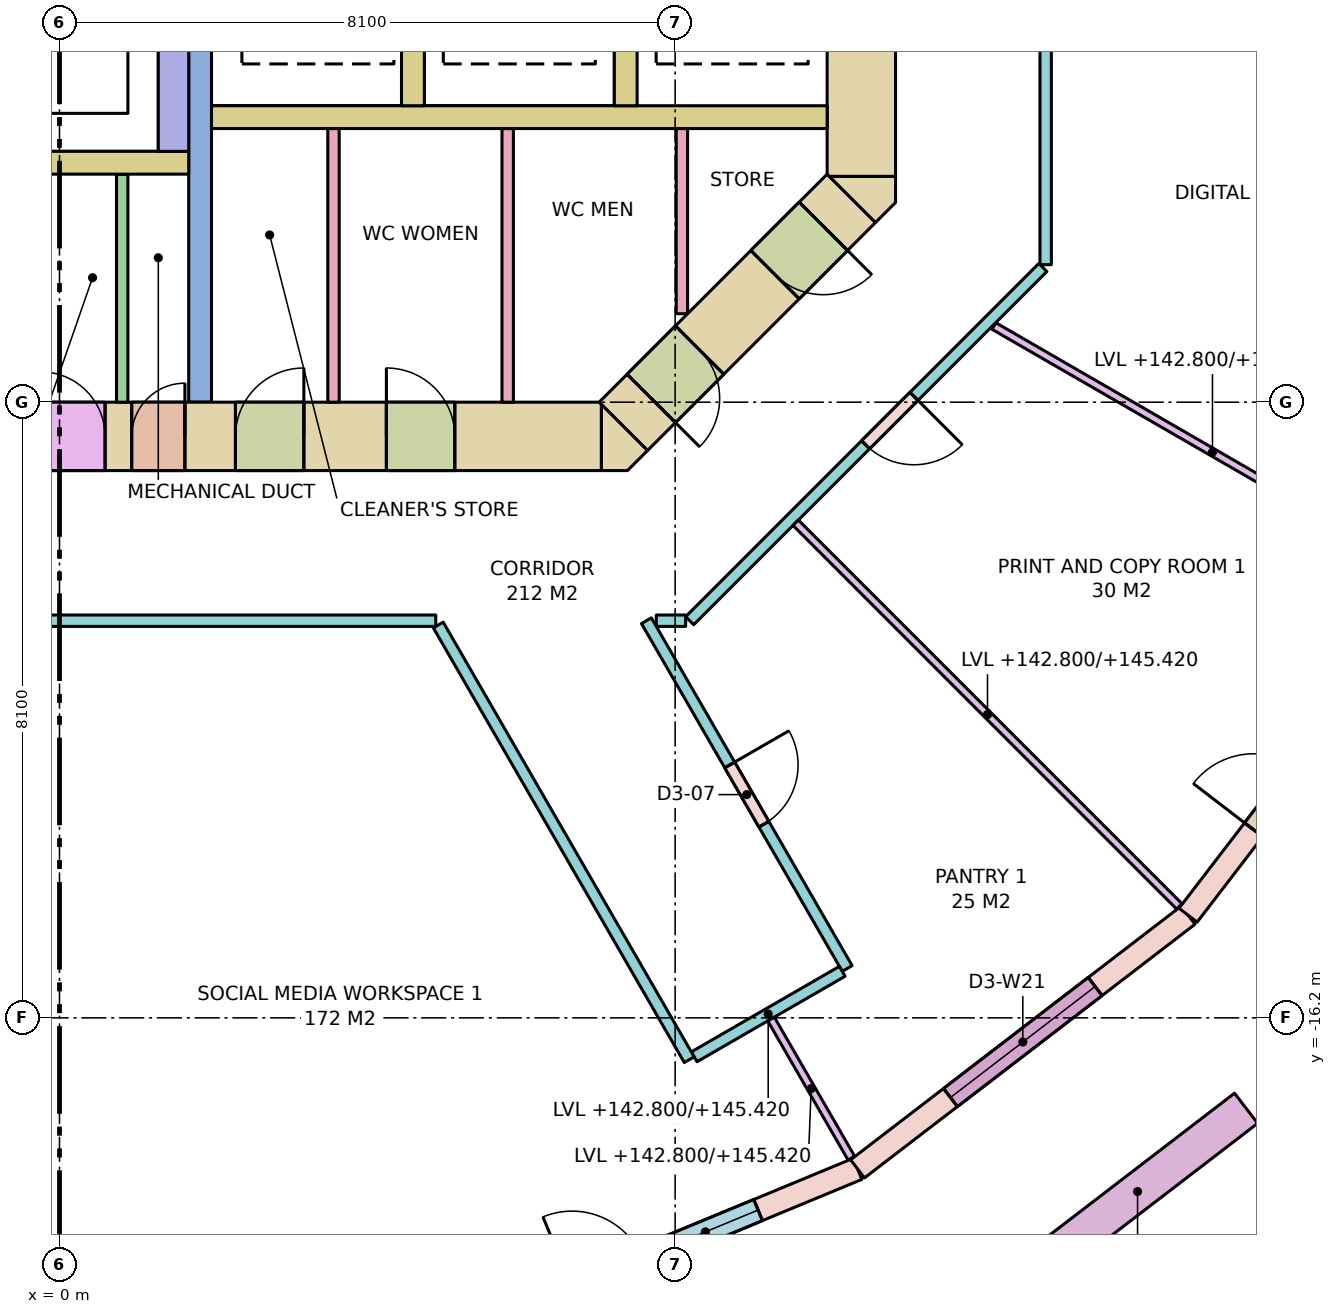
"""IFC4 building model, lengths in metres.
Left out: names, types, materials, properties, quantities, classifications, styles, units other than length and angle.
Written with IfcOpenShell. Run it as: python <this file> out.ifc"""

import sys

from ifc_helpers import new_model, si_unit, direction, frame, frame_2d, origin, place, context, subcontext, project, spatial, polyline, rectangle, outline, extrude, element, fill, save


model = new_model("IFC4")
c1 = context("Model", 3, precision=1e-05, world=origin(), true_north=direction((0.0, 1.0)))
c2 = subcontext(c1, "Body", "Model", "MODEL_VIEW")
j1 = project(units=[si_unit("LENGTHUNIT", "METRE"), si_unit("PLANEANGLEUNIT", "RADIAN")], contexts=[c1])
p1 = place(None, origin())
s1 = spatial("IfcSite", under=j1, at=p1, CompositionType="ELEMENT")
p2 = place(p1, origin())
s2 = spatial("IfcBuilding", under=s1, at=p2, CompositionType="ELEMENT")
p3 = place(p2, frame((0.0, 0.0, 142.8)))
s3 = spatial("IfcBuildingStorey", under=s2, at=p3, CompositionType="ELEMENT", Elevation=142.8)
p4 = place(p3, frame((-7.13, -8.55, -0.28), z_axis=(0.0, 0.0, 1.0), x_axis=(1.0, 0.0, 0.0)))
e1 = element("IfcWall", 1, at=p4, inside=s3, PredefinedType="SHEAR", context=c2, shape_type="SweptSolid", body=[
    extrude(rectangle(XDim=14.26, YDim=0.9, at=frame_2d((7.13, 0.0))), origin(), (0.0, 0.0, 1.0), 3.8),
])
p5 = place(p4, frame((8.08, 0.0, 0.28)))
e2 = element("IfcOpeningElement", 2, at=p5, cuts=e1, PredefinedType="OPENING", context=c2, shape_type="SweptSolid", body=[
    extrude(rectangle(XDim=0.7, YDim=2.1, at=frame_2d((0.35, 1.05))), frame((0.0, 0.46, 0.0), z_axis=(0.0, -1.0, 0.0), x_axis=(1.0, 0.0, 0.0)), (0.0, 0.0, 1.0), 0.92),
])
p6 = place(p4, frame((5.58, 0.0, 0.28)))
e3 = element("IfcOpeningElement", 3, at=p6, cuts=e1, PredefinedType="OPENING", context=c2, shape_type="SweptSolid", body=[
    extrude(rectangle(XDim=0.85, YDim=2.1, at=frame_2d((0.425, 1.05))), frame((0.0, 0.46, 0.0), z_axis=(0.0, -1.0, 0.0), x_axis=(1.0, 0.0, 0.0)), (0.0, 0.0, 1.0), 0.92),
])
p7 = place(p4, frame((6.88, 0.0, 0.28)))
e4 = element("IfcOpeningElement", 4, at=p7, cuts=e1, PredefinedType="OPENING", context=c2, shape_type="SweptSolid", body=[
    extrude(rectangle(XDim=0.85, YDim=2.1, at=frame_2d((0.425, 1.05))), frame((0.0, 0.46, 0.0), z_axis=(0.0, -1.0, 0.0), x_axis=(1.0, 0.0, 0.0)), (0.0, 0.0, 1.0), 0.92),
])
p8 = place(p4, frame((9.445, 0.0, 0.28)))
e5 = element("IfcOpeningElement", 5, at=p8, cuts=e1, PredefinedType="OPENING", context=c2, shape_type="SweptSolid", body=[
    extrude(rectangle(XDim=0.9, YDim=2.1, at=frame_2d((0.45, 1.05))), frame((0.0, 0.46, 0.0), z_axis=(0.0, -1.0, 0.0), x_axis=(1.0, 0.0, 0.0)), (0.0, 0.0, 1.0), 0.92),
])
p9 = place(p4, frame((11.431, 0.0, 0.28)))
e6 = element("IfcOpeningElement", 6, at=p9, cuts=e1, PredefinedType="OPENING", context=c2, shape_type="SweptSolid", body=[
    extrude(rectangle(XDim=0.9, YDim=2.1, at=frame_2d((0.45, 1.05))), frame((0.0, 0.46, 0.0), z_axis=(0.0, -1.0, 0.0), x_axis=(1.0, 0.0, 0.0)), (0.0, 0.0, 1.0), 0.92),
])
p10 = place(p3, frame((10.55, -5.13, -0.28), z_axis=(0.0, 0.0, 1.0), x_axis=(0.0, 1.0, 0.0)))
e7 = element("IfcWall", 7, at=p10, inside=s3, PredefinedType="SHEAR", context=c2, shape_type="SweptSolid", body=[
    extrude(rectangle(XDim=10.26, YDim=0.9, at=frame_2d((5.13, 0.0))), origin(), (0.0, 0.0, 1.0), 3.8),
])
p11 = place(p10, frame((4.13, 0.0, 0.28)))
e8 = element("IfcOpeningElement", 8, at=p11, cuts=e7, PredefinedType="OPENING", context=c2, shape_type="SweptSolid", body=[
    extrude(rectangle(XDim=2.0, YDim=2.1, at=frame_2d((1.0, 1.05))), frame((0.0, 0.46, 0.0), z_axis=(0.0, -1.0, 0.0), x_axis=(1.0, 0.0, 0.0)), (0.0, 0.0, 1.0), 0.92),
])
p12 = place(p3, frame((10.418, -5.418, -0.28), z_axis=(0.0, 0.0, 1.0), x_axis=(-0.707106781187, -0.707106781187, 0.0)))
e9 = element("IfcWall", 9, at=p12, inside=s3, PredefinedType="SHEAR", context=c2, shape_type="SweptSolid", body=[
    extrude(rectangle(XDim=4.243, YDim=0.9, at=frame_2d((2.121, 0.0))), origin(), (0.0, 0.0, 1.0), 3.8),
])
p13 = place(p12, frame((2.823, 0.0, 0.28)))
e10 = element("IfcOpeningElement", 10, at=p13, cuts=e9, PredefinedType="OPENING", context=c2, shape_type="SweptSolid", body=[
    extrude(rectangle(XDim=0.9, YDim=2.1, at=frame_2d((0.45, 1.05))), frame((0.0, 0.46, 0.0), z_axis=(0.0, -1.0, 0.0), x_axis=(1.0, 0.0, 0.0)), (0.0, 0.0, 1.0), 0.92),
])
p14 = place(p12, frame((0.52, 0.0, 0.28)))
e11 = element("IfcOpeningElement", 11, at=p14, cuts=e9, PredefinedType="OPENING", context=c2, shape_type="SweptSolid", body=[
    extrude(rectangle(XDim=0.9, YDim=2.1, at=frame_2d((0.45, 1.05))), frame((0.0, 0.46, 0.0), z_axis=(0.0, -1.0, 0.0), x_axis=(1.0, 0.0, 0.0)), (0.0, 0.0, 1.0), 0.92),
])
p15 = place(p3, frame((0.0, 0.0, -0.28)))
e12 = element("IfcWall", 12, at=p15, inside=s3, PredefinedType="SHEAR", context=c2, shape_type="SweptSolid", body=[
    extrude(outline(polyline([(7.473, -9.0), (7.13, -9.0), (7.13, -8.13), (7.736, -8.736), (7.473, -9.0)])), origin(), (0.0, 0.0, 1.0), 3.8),
])
p16 = place(p3, frame((0.0, 0.0, -0.28)))
e13 = element("IfcWall", 13, at=p16, inside=s3, PredefinedType="SHEAR", context=c2, shape_type="SweptSolid", body=[
    extrude(outline(polyline([(11.0, -5.473), (10.736, -5.736), (10.13, -5.13), (11.0, -5.13), (11.0, -5.473)])), origin(), (0.0, 0.0, 1.0), 3.8),
])
p17 = place(p3, frame((2.0, -4.35, 0.0), z_axis=(0.0, 0.0, 1.0), x_axis=(1.0, 0.0, 0.0)))
e14 = element("IfcWall", 14, at=p17, inside=s3, PredefinedType="SOLIDWALL", context=c2, shape_type="SweptSolid", body=[
    extrude(rectangle(XDim=8.1, YDim=0.3, at=frame_2d((4.05, 0.0))), origin(), (0.0, 0.0, 1.0), 3.52),
])
for number, where, z_axis, x_axis in (
    (15, (4.65, -4.2, 0.0), (0.0, 0.0, 1.0), (0.0, 1.0, 0.0)),
    (16, (7.45, -4.2, 0.0), (0.0, 0.0, 1.0), (0.0, 1.0, 0.0)),
):
    element("IfcWall", number, at=place(p3, frame(where, z_axis=z_axis, x_axis=x_axis)), inside=s3, PredefinedType="SOLIDWALL", context=c2, shape_type="SweptSolid", body=[
        extrude(rectangle(XDim=2.4, YDim=0.3, at=frame_2d((1.2, 0.0))), origin(), (0.0, 0.0, 1.0), 3.52),
    ])
p18 = place(p3, frame((1.85, -8.1, 0.0), z_axis=(0.0, 0.0, 1.0), x_axis=(0.0, 1.0, 0.0)))
e17 = element("IfcWall", 17, at=p18, inside=s3, PredefinedType="SHEAR", context=c2, shape_type="SweptSolid", body=[
    extrude(rectangle(XDim=6.6, YDim=0.3, at=frame_2d((3.3, 0.0))), origin(), (0.0, 0.0, 1.0), 3.52),
])
p19 = place(p3, frame((1.5, -4.8, 0.0), z_axis=(0.0, 0.0, 1.0), x_axis=(0.0, 1.0, 0.0)))
e18 = element("IfcWall", 18, at=p19, inside=s3, PredefinedType="SOLIDWALL", context=c2, shape_type="SweptSolid", body=[
    extrude(rectangle(XDim=3.0, YDim=0.4, at=frame_2d((1.5, 0.0))), origin(), (0.0, 0.0, 1.0), 3.52),
])
p20 = place(p3, frame((-1.7, -4.95, 0.0), z_axis=(0.0, 0.0, 1.0), x_axis=(1.0, 0.0, 0.0)))
e19 = element("IfcWall", 19, at=p20, inside=s3, PredefinedType="SOLIDWALL", context=c2, shape_type="SweptSolid", body=[
    extrude(rectangle(XDim=3.4, YDim=0.3, at=frame_2d((1.7, 0.0))), origin(), (0.0, 0.0, 1.0), 3.52),
])
p21 = place(p3, frame((5.435, -20.284, 0.0), z_axis=(0.0, 0.0, 1.0), x_axis=(0.923877333662, 0.382688740813, 0.0)))
e20 = element("IfcWall", 20, at=p21, inside=s3, PredefinedType="STANDARD", context=c2, shape_type="SweptSolid", body=[
    extrude(rectangle(XDim=5.482, YDim=0.3, at=frame_2d((2.741, 0.0))), origin(), (0.0, 0.0, 1.0), 3.52),
])
p22 = place(p21, frame((1.416, 0.0, 0.0)))
e21 = element("IfcOpeningElement", 21, at=p22, cuts=e20, PredefinedType="OPENING", context=c2, shape_type="SweptSolid", body=[
    extrude(rectangle(XDim=1.0, YDim=2.4, at=frame_2d((0.5, 1.2))), frame((0.0, 0.16, 0.0), z_axis=(0.0, -1.0, 0.0), x_axis=(1.0, 0.0, 0.0)), (0.0, 0.0, 1.0), 0.32),
])
p23 = place(p21, frame((2.566, 0.0, 0.8)))
e22 = element("IfcOpeningElement", 22, at=p23, cuts=e20, PredefinedType="OPENING", context=c2, shape_type="SweptSolid", body=[
    extrude(rectangle(XDim=1.5, YDim=2.5, at=frame_2d((0.75, 1.25))), frame((0.0, 0.16, 0.0), z_axis=(0.0, -1.0, 0.0), x_axis=(1.0, 0.0, 0.0)), (0.0, 0.0, 1.0), 0.32),
])
p24 = place(p3, frame((10.5, -18.187, 0.0), z_axis=(0.0, 0.0, 1.0), x_axis=(0.793335336593, 0.608784891166, 0.0)))
e23 = element("IfcWall", 23, at=p24, inside=s3, PredefinedType="STANDARD", context=c2, shape_type="SweptSolid", body=[
    extrude(rectangle(XDim=5.482, YDim=0.3, at=frame_2d((2.741, 0.0))), origin(), (0.0, 0.0, 1.0), 3.52),
])
p25 = place(p24, frame((1.541, 0.0, 0.8)))
e24 = element("IfcOpeningElement", 24, at=p25, cuts=e23, PredefinedType="OPENING", context=c2, shape_type="SweptSolid", body=[
    extrude(rectangle(XDim=2.4, YDim=2.5, at=frame_2d((1.2, 1.25))), frame((0.0, 0.16, 0.0), z_axis=(0.0, -1.0, 0.0), x_axis=(1.0, 0.0, 0.0)), (0.0, 0.0, 1.0), 0.32),
])
p26 = place(p3, frame((14.849, -14.849, 0.0), z_axis=(0.0, 0.0, 1.0), x_axis=(0.608784891166, 0.793335336593, 0.0)))
e25 = element("IfcWall", 25, at=p26, inside=s3, PredefinedType="STANDARD", context=c2, shape_type="SweptSolid", body=[
    extrude(rectangle(XDim=5.482, YDim=0.3, at=frame_2d((2.741, 0.0))), origin(), (0.0, 0.0, 1.0), 3.52),
])
p27 = place(p26, frame((1.416, 0.0, 0.0)))
e26 = element("IfcOpeningElement", 26, at=p27, cuts=e25, PredefinedType="OPENING", context=c2, shape_type="SweptSolid", body=[
    extrude(rectangle(XDim=1.0, YDim=2.4, at=frame_2d((0.5, 1.2))), frame((0.0, 0.16, 0.0), z_axis=(0.0, -1.0, 0.0), x_axis=(1.0, 0.0, 0.0)), (0.0, 0.0, 1.0), 0.32),
])
p28 = place(p26, frame((2.566, 0.0, 0.8)))
e27 = element("IfcOpeningElement", 27, at=p28, cuts=e25, PredefinedType="OPENING", context=c2, shape_type="SweptSolid", body=[
    extrude(rectangle(XDim=1.5, YDim=2.5, at=frame_2d((0.75, 1.25))), frame((0.0, 0.16, 0.0), z_axis=(0.0, -1.0, 0.0), x_axis=(1.0, 0.0, 0.0)), (0.0, 0.0, 1.0), 0.32),
])
p29 = place(p3, frame((12.756, -19.581, 0.0), z_axis=(0.0, 0.0, 1.0), x_axis=(0.793384730612, 0.608720518162, 0.0)))
e28 = element("IfcWall", 28, at=p29, inside=s3, PredefinedType="PARAPET", context=c2, shape_type="SweptSolid", body=[
    extrude(rectangle(XDim=3.6, YDim=0.5, at=frame_2d((1.8, 0.0))), origin(), (0.0, 0.0, 1.0), 0.9),
])
p30 = place(p3, frame((0.825, -8.1, 0.0), z_axis=(0.0, 0.0, 1.0), x_axis=(0.0, 1.0, 0.0)))
e29 = element("IfcWall", 29, at=p30, inside=s3, PredefinedType="PARTITIONING", context=c2, shape_type="SweptSolid", body=[
    extrude(rectangle(XDim=3.0, YDim=0.15, at=frame_2d((1.5, 0.0))), origin(), (0.0, 0.0, 1.0), 3.52),
])
for number, where, z_axis, x_axis in (
    (30, (3.605, -8.1, 0.0), (0.0, 0.0, 1.0), (0.0, 1.0, 0.0)),
    (31, (5.897, -8.1, 0.0), (0.0, 0.0, 1.0), (0.0, 1.0, 0.0)),
):
    element("IfcWall", number, at=place(p3, frame(where, z_axis=z_axis, x_axis=x_axis)), inside=s3, PredefinedType="PARTITIONING", context=c2, shape_type="SweptSolid", body=[
        extrude(rectangle(XDim=3.6, YDim=0.15, at=frame_2d((1.8, 0.0))), origin(), (0.0, 0.0, 1.0), 3.52),
    ])
p31 = place(p3, frame((8.189, -6.936, 0.0), z_axis=(0.0, 0.0, 1.0), x_axis=(0.0, 1.0, 0.0)))
e32 = element("IfcWall", 32, at=p31, inside=s3, PredefinedType="PARTITIONING", context=c2, shape_type="SweptSolid", body=[
    extrude(rectangle(XDim=2.436, YDim=0.15, at=frame_2d((1.218, 0.0))), origin(), (0.0, 0.0, 1.0), 3.52),
])
p32 = place(p3, frame((12.975, 6.105, 0.0), z_axis=(0.0, 0.0, 1.0), x_axis=(0.0, -1.0, 0.0)))
e33 = element("IfcWall", 33, at=p32, inside=s3, PredefinedType="PARTITIONING", context=c2, shape_type="SweptSolid", body=[
    extrude(rectangle(XDim=12.396, YDim=0.15, at=frame_2d((6.198, 0.0))), origin(), (0.0, 0.0, 1.0), 2.62),
])
p33 = place(p32, frame((5.298, 0.0, 0.0)))
e34 = element("IfcOpeningElement", 34, at=p33, cuts=e33, PredefinedType="OPENING", context=c2, shape_type="SweptSolid", body=[
    extrude(rectangle(XDim=1.8, YDim=2.1, at=frame_2d((0.9, 1.05))), frame((0.0, 0.085, 0.0), z_axis=(0.0, -1.0, 0.0), x_axis=(1.0, 0.0, 0.0)), (0.0, 0.0, 1.0), 0.17),
])
p34 = place(p3, frame((12.938, -6.328, 0.0), z_axis=(0.0, 0.0, 1.0), x_axis=(-0.707088206597, -0.707125355289, 0.0)))
e35 = element("IfcWall", 35, at=p34, inside=s3, PredefinedType="PARTITIONING", context=c2, shape_type="SweptSolid", body=[
    extrude(rectangle(XDim=6.572, YDim=0.15, at=frame_2d((3.286, 0.0))), origin(), (0.0, 0.0, 1.0), 2.62),
])
p35 = place(p34, frame((2.398, 0.0, 0.0)))
e36 = element("IfcOpeningElement", 36, at=p35, cuts=e35, PredefinedType="OPENING", context=c2, shape_type="SweptSolid", body=[
    extrude(rectangle(XDim=0.9, YDim=2.1, at=frame_2d((0.45, 1.05))), frame((0.0, 0.085, 0.0), z_axis=(0.0, -1.0, 0.0), x_axis=(1.0, 0.0, 0.0)), (0.0, 0.0, 1.0), 0.17),
])
p36 = place(p3, frame((8.238, -10.975, 0.0), z_axis=(0.0, 0.0, 1.0), x_axis=(-1.0, 0.0, 0.0)))
e37 = element("IfcWall", 37, at=p36, inside=s3, PredefinedType="PARTITIONING", context=c2, shape_type="SweptSolid", body=[
    extrude(rectangle(XDim=0.386, YDim=0.15, at=frame_2d((0.193, 0.0))), origin(), (0.0, 0.0, 1.0), 3.52),
])
p37 = place(p3, frame((7.722, -10.975, 0.0), z_axis=(0.0, 0.0, 1.0), x_axis=(0.499981143329, -0.866036290415, 0.0)))
e38 = element("IfcWall", 38, at=p37, inside=s3, PredefinedType="PARTITIONING", context=c2, shape_type="SweptSolid", body=[
    extrude(rectangle(XDim=5.283, YDim=0.15, at=frame_2d((2.642, 0.0))), origin(), (0.0, 0.0, 1.0), 3.52),
])
p38 = place(p37, frame((2.191, 0.0, 0.0)))
e39 = element("IfcOpeningElement", 39, at=p38, cuts=e38, PredefinedType="OPENING", context=c2, shape_type="SweptSolid", body=[
    extrude(rectangle(XDim=0.9, YDim=2.1, at=frame_2d((0.45, 1.05))), frame((0.0, 0.085, 0.0), z_axis=(0.0, -1.0, 0.0), x_axis=(1.0, 0.0, 0.0)), (0.0, 0.0, 1.0), 0.17),
])
p39 = place(p3, frame((10.299, -15.588, 0.0), z_axis=(0.0, 0.0, 1.0), x_axis=(-0.866017533419, -0.500013631625, 0.0)))
e40 = element("IfcWall", 40, at=p39, inside=s3, PredefinedType="PARTITIONING", context=c2, shape_type="SweptSolid", body=[
    extrude(rectangle(XDim=2.25, YDim=0.15, at=frame_2d((1.125, 0.0))), origin(), (0.0, 0.0, 1.0), 2.62),
])
p40 = place(p3, frame((8.285, -16.75, 0.0), z_axis=(0.0, 0.0, 1.0), x_axis=(-0.499988075443, 0.866032288321, 0.0)))
e41 = element("IfcWall", 41, at=p40, inside=s3, PredefinedType="PARTITIONING", context=c2, shape_type="SweptSolid", body=[
    extrude(rectangle(XDim=6.604, YDim=0.15, at=frame_2d((3.302, 0.0))), origin(), (0.0, 0.0, 1.0), 3.52),
])
p41 = place(p3, frame((4.951, -10.975, 0.0), z_axis=(0.0, 0.0, 1.0), x_axis=(-1.0, 0.0, 0.0)))
e42 = element("IfcWall", 42, at=p41, inside=s3, PredefinedType="PARTITIONING", context=c2, shape_type="SweptSolid", body=[
    extrude(rectangle(XDim=13.242, YDim=0.15, at=frame_2d((6.621, 0.0))), origin(), (0.0, 0.0, 1.0), 2.62),
])
p42 = place(p41, frame((5.721, 0.0, 0.0)))
e43 = element("IfcOpeningElement", 43, at=p42, cuts=e42, PredefinedType="OPENING", context=c2, shape_type="SweptSolid", body=[
    extrude(rectangle(XDim=1.8, YDim=2.1, at=frame_2d((0.9, 1.05))), frame((0.0, 0.085, 0.0), z_axis=(0.0, -1.0, 0.0), x_axis=(1.0, 0.0, 0.0)), (0.0, 0.0, 1.0), 0.17),
])
p43 = place(p3, frame((9.362, -16.215, 0.0), z_axis=(0.0, 0.0, 1.0), x_axis=(0.500015802937, -0.866016279763, 0.0)))
e44 = element("IfcWall", 44, at=p43, inside=s3, PredefinedType="PARTITIONING", context=c2, shape_type="SweptSolid", body=[
    extrude(rectangle(XDim=2.113, YDim=0.1, at=frame_2d((1.057, 0.0))), origin(), (0.0, 0.0, 1.0), 2.62),
])
p44 = place(p3, frame((9.686, -9.686, 0.0), z_axis=(0.0, 0.0, 1.0), x_axis=(0.707106781187, -0.707106781187, 0.0)))
e45 = element("IfcWall", 45, at=p44, inside=s3, PredefinedType="PARTITIONING", context=c2, shape_type="SweptSolid", body=[
    extrude(rectangle(XDim=7.139, YDim=0.1, at=frame_2d((3.569, 0.0))), origin(), (0.0, 0.0, 1.0), 2.62),
])
p45 = place(p3, frame((12.294, -7.098, 0.0), z_axis=(0.0, 0.0, 1.0), x_axis=(0.866010486135, -0.500025837236, 0.0)))
e46 = element("IfcWall", 46, at=p45, inside=s3, PredefinedType="PARTITIONING", context=c2, shape_type="SweptSolid", body=[
    extrude(rectangle(XDim=6.641, YDim=0.1, at=frame_2d((3.32, 0.0))), origin(), (0.0, 0.0, 1.0), 2.62),
])
p46 = place(p23, origin())
e47 = element("IfcWindow", 47, at=p46, inside=s3, PartitioningType="SINGLE_PANEL", PredefinedType="WINDOW", context=c2, shape_type="SweptSolid", body=[
    extrude(rectangle(XDim=1.5, YDim=2.5, at=frame_2d((0.75, 1.25))), frame((0.0, 0.03, 0.0), z_axis=(0.0, -1.0, 0.0), x_axis=(1.0, 0.0, 0.0)), (0.0, 0.0, 1.0), 0.06),
])
fill(e22, e47)
p47 = place(p25, origin())
e48 = element("IfcWindow", 48, at=p47, inside=s3, PartitioningType="SINGLE_PANEL", PredefinedType="WINDOW", context=c2, shape_type="SweptSolid", body=[
    extrude(rectangle(XDim=2.4, YDim=2.5, at=frame_2d((1.2, 1.25))), frame((0.0, 0.03, 0.0), z_axis=(0.0, -1.0, 0.0), x_axis=(1.0, 0.0, 0.0)), (0.0, 0.0, 1.0), 0.06),
])
fill(e24, e48)
p48 = place(p27, origin())
e49 = element("IfcDoor", 49, at=p48, inside=s3, OperationType="SINGLE_SWING_LEFT", PredefinedType="DOOR", context=c2, shape_type="SweptSolid", body=[
    extrude(rectangle(XDim=1.0, YDim=2.4, at=frame_2d((0.5, 1.2))), frame((0.0, 0.025, 0.0), z_axis=(0.0, -1.0, 0.0), x_axis=(1.0, 0.0, 0.0)), (0.0, 0.0, 1.0), 0.05),
])
fill(e26, e49)
p49 = place(p5, origin())
e50 = element("IfcDoor", 50, at=p49, inside=s3, OperationType="SINGLE_SWING_RIGHT", PredefinedType="DOOR", context=c2, shape_type="SweptSolid", body=[
    extrude(rectangle(XDim=0.7, YDim=2.1, at=frame_2d((0.35, 1.05))), frame((0.0, 0.025, 0.0), z_axis=(0.0, -1.0, 0.0), x_axis=(1.0, 0.0, 0.0)), (0.0, 0.0, 1.0), 0.05),
])
fill(e2, e50)
p50 = place(p7, origin())
e51 = element("IfcDoor", 51, at=p50, inside=s3, OperationType="SINGLE_SWING_LEFT", PredefinedType="DOOR", context=c2, shape_type="SweptSolid", body=[
    extrude(rectangle(XDim=0.85, YDim=2.1, at=frame_2d((0.425, 1.05))), frame((0.0, 0.025, 0.0), z_axis=(0.0, -1.0, 0.0), x_axis=(1.0, 0.0, 0.0)), (0.0, 0.0, 1.0), 0.05),
])
fill(e4, e51)
p51 = place(p8, origin())
e52 = element("IfcDoor", 52, at=p51, inside=s3, OperationType="SINGLE_SWING_RIGHT", PredefinedType="DOOR", context=c2, shape_type="SweptSolid", body=[
    extrude(rectangle(XDim=0.9, YDim=2.1, at=frame_2d((0.45, 1.05))), frame((0.0, 0.025, 0.0), z_axis=(0.0, -1.0, 0.0), x_axis=(1.0, 0.0, 0.0)), (0.0, 0.0, 1.0), 0.05),
])
fill(e5, e52)
p52 = place(p9, origin())
e53 = element("IfcDoor", 53, at=p52, inside=s3, OperationType="SINGLE_SWING_LEFT", PredefinedType="DOOR", context=c2, shape_type="SweptSolid", body=[
    extrude(rectangle(XDim=0.9, YDim=2.1, at=frame_2d((0.45, 1.05))), frame((0.0, 0.025, 0.0), z_axis=(0.0, -1.0, 0.0), x_axis=(1.0, 0.0, 0.0)), (0.0, 0.0, 1.0), 0.05),
])
fill(e6, e53)
p53 = place(p13, origin())
e54 = element("IfcDoor", 54, at=p53, inside=s3, OperationType="SINGLE_SWING_RIGHT", PredefinedType="DOOR", context=c2, shape_type="SweptSolid", body=[
    extrude(rectangle(XDim=0.9, YDim=2.1, at=frame_2d((0.45, 1.05))), frame((0.0, 0.025, 0.0), z_axis=(0.0, -1.0, 0.0), x_axis=(1.0, 0.0, 0.0)), (0.0, 0.0, 1.0), 0.05),
])
fill(e10, e54)
p54 = place(p14, origin())
e55 = element("IfcDoor", 55, at=p54, inside=s3, OperationType="SINGLE_SWING_LEFT", PredefinedType="DOOR", context=c2, shape_type="SweptSolid", body=[
    extrude(rectangle(XDim=0.9, YDim=2.1, at=frame_2d((0.45, 1.05))), frame((0.0, 0.025, 0.0), z_axis=(0.0, -1.0, 0.0), x_axis=(1.0, 0.0, 0.0)), (0.0, 0.0, 1.0), 0.05),
])
fill(e11, e55)
p55 = place(p38, origin())
e56 = element("IfcDoor", 56, at=p55, inside=s3, OperationType="SINGLE_SWING_LEFT", PredefinedType="DOOR", context=c2, shape_type="SweptSolid", body=[
    extrude(rectangle(XDim=0.9, YDim=2.1, at=frame_2d((0.45, 1.05))), frame((0.0, 0.025, 0.0), z_axis=(0.0, -1.0, 0.0), x_axis=(1.0, 0.0, 0.0)), (0.0, 0.0, 1.0), 0.05),
])
fill(e39, e56)
p56 = place(p35, origin())
e57 = element("IfcDoor", 57, at=p56, inside=s3, OperationType="SINGLE_SWING_LEFT", PredefinedType="DOOR", context=c2, shape_type="SweptSolid", body=[
    extrude(rectangle(XDim=0.9, YDim=2.1, at=frame_2d((0.45, 1.05))), frame((0.0, 0.025, 0.0), z_axis=(0.0, -1.0, 0.0), x_axis=(1.0, 0.0, 0.0)), (0.0, 0.0, 1.0), 0.05),
])
fill(e36, e57)
save(model, sys.argv[1])
